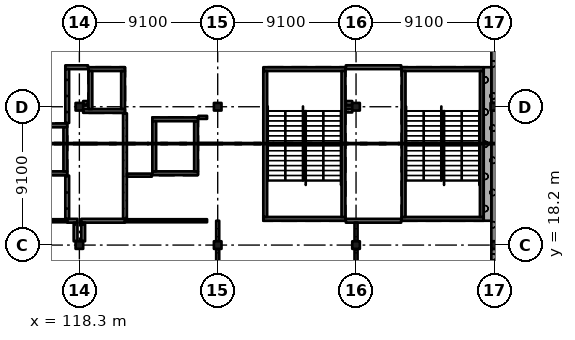
"""IFC4 building model, lengths in metres.
Left out: names, types, materials, properties, quantities, classifications, styles, units other than length and angle.
Written with IfcOpenShell. Run it as: python <this file> out.ifc"""

import sys

from ifc_helpers import new_model, si_unit, direction, frame, frame_2d, origin, origin_2d, place, context, subcontext, project, spatial, rectangle, extrude, element, fill, save


model = new_model("IFC4")
c1 = context("Model", 3, precision=1e-05, world=origin(), true_north=direction((0.0, 1.0)))
c2 = subcontext(c1, "Body", "Model", "MODEL_VIEW")
j1 = project(units=[si_unit("LENGTHUNIT", "METRE"), si_unit("PLANEANGLEUNIT", "RADIAN")], contexts=[c1])
p1 = place(None, origin())
s1 = spatial("IfcSite", under=j1, at=p1, CompositionType="ELEMENT")
p2 = place(p1, origin())
s2 = spatial("IfcBuilding", under=s1, at=p2, CompositionType="ELEMENT")
p3 = place(p2, frame((0.0, 0.0, 24.57)))
s3 = spatial("IfcBuildingStorey", under=s2, at=p3, CompositionType="ELEMENT", Elevation=24.57)
for number, where, z_axis, x_axis in (
    (1, (118.3, 18.2, 0.0), (0.0, 0.0, 1.0), (1.0, 0.0, 0.0)),
    (2, (118.3, 27.3, 0.0), (0.0, 0.0, 1.0), (1.0, 0.0, 0.0)),
    (3, (127.4, 18.2, 0.0), (0.0, 0.0, 1.0), (1.0, 0.0, 0.0)),
    (4, (127.4, 27.3, 0.0), (0.0, 0.0, 1.0), (1.0, 0.0, 0.0)),
    (5, (136.5, 18.2, 0.0), (0.0, 0.0, 1.0), (1.0, 0.0, 0.0)),
    (6, (136.5, 27.3, 0.0), (0.0, 0.0, 1.0), (1.0, 0.0, 0.0)),
    (7, (145.65, 18.2, 0.0), (0.0, 0.0, 1.0), (1.0, 0.0, 0.0)),
    (8, (145.6, 27.3, 0.0), (0.0, 0.0, 1.0), (1.0, 0.0, 0.0)),
):
    element("IfcColumn", number, at=place(p3, frame(where, z_axis=z_axis, x_axis=x_axis)), inside=s3, PredefinedType="COLUMN", context=c2, shape_type="SweptSolid", body=[
        extrude(rectangle(XDim=0.5, YDim=0.5, at=origin_2d()), origin(), (0.0, 0.0, 1.0), 4.55),
    ])
p4 = place(p3, frame((117.5, 22.925, 0.0), z_axis=(0.0, 0.0, 1.0), x_axis=(-1.0, 0.0, 0.0)))
e9 = element("IfcWall", 9, at=p4, inside=s3, PredefinedType="SHEAR", context=c2, shape_type="SweptSolid", body=[
    extrude(rectangle(XDim=2.6, YDim=0.25, at=frame_2d((1.3, 0.0))), origin(), (0.0, 0.0, 1.0), 4.55),
])
p5 = place(p4, frame((0.8, 0.0, 0.0)))
e10 = element("IfcOpeningElement", 10, at=p5, cuts=e9, PredefinedType="OPENING", context=c2, shape_type="SweptSolid", body=[
    extrude(rectangle(XDim=1.0, YDim=2.1, at=frame_2d((0.5, 1.05))), frame((0.0, 0.135, 0.0), z_axis=(0.0, -1.0, 0.0), x_axis=(1.0, 0.0, 0.0)), (0.0, 0.0, 1.0), 0.27),
])
p6 = place(p3, frame((117.5, 26.075, 0.0), z_axis=(0.0, 0.0, 1.0), x_axis=(-1.0, 0.0, 0.0)))
e11 = element("IfcWall", 11, at=p6, inside=s3, PredefinedType="SHEAR", context=c2, shape_type="SweptSolid", body=[
    extrude(rectangle(XDim=2.6, YDim=0.25, at=frame_2d((1.3, 0.0))), origin(), (0.0, 0.0, 1.0), 4.55),
])
p7 = place(p3, frame((117.375, 25.95, 0.0), z_axis=(0.0, 0.0, 1.0), x_axis=(0.0, -1.0, 0.0)))
e12 = element("IfcWall", 12, at=p7, inside=s3, PredefinedType="SHEAR", context=c2, shape_type="SweptSolid", body=[
    extrude(rectangle(XDim=2.9, YDim=0.25, at=frame_2d((1.45, 0.0))), origin(), (0.0, 0.0, 1.0), 4.55),
])
p8 = place(p3, frame((121.3, 27.025, 0.0), z_axis=(0.0, 0.0, 1.0), x_axis=(-1.0, 0.0, 0.0)))
e13 = element("IfcWall", 13, at=p8, inside=s3, PredefinedType="SHEAR", context=c2, shape_type="SweptSolid", body=[
    extrude(rectangle(XDim=2.75, YDim=0.25, at=frame_2d((1.375, 0.0))), origin(), (0.0, 0.0, 1.0), 4.55),
])
p9 = place(p3, frame((121.3, 29.775, 0.0), z_axis=(0.0, 0.0, 1.0), x_axis=(-1.0, 0.0, 0.0)))
e14 = element("IfcWall", 14, at=p9, inside=s3, PredefinedType="SHEAR", context=c2, shape_type="SweptSolid", body=[
    extrude(rectangle(XDim=2.4, YDim=0.25, at=frame_2d((1.2, 0.0))), origin(), (0.0, 0.0, 1.0), 4.55),
])
p10 = place(p3, frame((119.025, 29.65, 0.0), z_axis=(0.0, 0.0, 1.0), x_axis=(0.0, -1.0, 0.0)))
e15 = element("IfcWall", 15, at=p10, inside=s3, PredefinedType="SHEAR", context=c2, shape_type="SweptSolid", body=[
    extrude(rectangle(XDim=2.5, YDim=0.25, at=frame_2d((1.25, 0.0))), origin(), (0.0, 0.0, 1.0), 4.55),
])
p11 = place(p3, frame((121.175, 29.65, 0.0), z_axis=(0.0, 0.0, 1.0), x_axis=(0.0, -1.0, 0.0)))
e16 = element("IfcWall", 16, at=p11, inside=s3, PredefinedType="SHEAR", context=c2, shape_type="SweptSolid", body=[
    extrude(rectangle(XDim=2.5, YDim=0.25, at=frame_2d((1.25, 0.0))), origin(), (0.0, 0.0, 1.0), 4.55),
])
p12 = place(p11, frame((0.9, 0.0, 0.0)))
e17 = element("IfcOpeningElement", 17, at=p12, cuts=e16, PredefinedType="OPENING", context=c2, shape_type="SweptSolid", body=[
    extrude(rectangle(XDim=0.7, YDim=2.1, at=frame_2d((0.35, 1.05))), frame((0.0, 0.135, 0.0), z_axis=(0.0, -1.0, 0.0), x_axis=(1.0, 0.0, 0.0)), (0.0, 0.0, 1.0), 0.27),
])
p13 = place(p3, frame((126.1, 22.925, 0.0), z_axis=(0.0, 0.0, 1.0), x_axis=(-1.0, 0.0, 0.0)))
e18 = element("IfcWall", 18, at=p13, inside=s3, PredefinedType="SHEAR", context=c2, shape_type="SweptSolid", body=[
    extrude(rectangle(XDim=3.0, YDim=0.25, at=frame_2d((1.5, 0.0))), origin(), (0.0, 0.0, 1.0), 4.55),
])
p14 = place(p13, frame((0.95, 0.0, 0.0)))
e19 = element("IfcOpeningElement", 19, at=p14, cuts=e18, PredefinedType="OPENING", context=c2, shape_type="SweptSolid", body=[
    extrude(rectangle(XDim=1.1, YDim=2.1, at=frame_2d((0.55, 1.05))), frame((0.0, 0.135, 0.0), z_axis=(0.0, -1.0, 0.0), x_axis=(1.0, 0.0, 0.0)), (0.0, 0.0, 1.0), 0.27),
])
p15 = place(p3, frame((126.1, 26.475, 0.0), z_axis=(0.0, 0.0, 1.0), x_axis=(-1.0, 0.0, 0.0)))
e20 = element("IfcWall", 20, at=p15, inside=s3, PredefinedType="SHEAR", context=c2, shape_type="SweptSolid", body=[
    extrude(rectangle(XDim=3.0, YDim=0.25, at=frame_2d((1.5, 0.0))), origin(), (0.0, 0.0, 1.0), 4.55),
])
for number, where, z_axis, x_axis in (
    (21, (123.225, 26.35, 0.0), (0.0, 0.0, 1.0), (0.0, -1.0, 0.0)),
    (22, (125.975, 26.35, 0.0), (0.0, 0.0, 1.0), (0.0, -1.0, 0.0)),
):
    element("IfcWall", number, at=place(p3, frame(where, z_axis=z_axis, x_axis=x_axis)), inside=s3, PredefinedType="SHEAR", context=c2, shape_type="SweptSolid", body=[
        extrude(rectangle(XDim=3.3, YDim=0.25, at=frame_2d((1.65, 0.0))), origin(), (0.0, 0.0, 1.0), 4.55),
    ])
p16 = place(p3, frame((144.9, 19.925, 0.0), z_axis=(0.0, 0.0, 1.0), x_axis=(-1.0, 0.0, 0.0)))
e23 = element("IfcWall", 23, at=p16, inside=s3, PredefinedType="SHEAR", context=c2, shape_type="SweptSolid", body=[
    extrude(rectangle(XDim=5.4, YDim=0.25, at=frame_2d((2.7, 0.0))), origin(), (0.0, 0.0, 1.0), 4.55),
])
p17 = place(p16, frame((1.5, 0.0, 0.0)))
e24 = element("IfcOpeningElement", 24, at=p17, cuts=e23, PredefinedType="OPENING", context=c2, shape_type="SweptSolid", body=[
    extrude(rectangle(XDim=2.4, YDim=2.1, at=frame_2d((1.2, 1.05))), frame((0.0, 0.135, 0.0), z_axis=(0.0, -1.0, 0.0), x_axis=(1.0, 0.0, 0.0)), (0.0, 0.0, 1.0), 0.27),
])
p18 = place(p3, frame((144.9, 29.775, 0.0), z_axis=(0.0, 0.0, 1.0), x_axis=(-1.0, 0.0, 0.0)))
e25 = element("IfcWall", 25, at=p18, inside=s3, PredefinedType="SHEAR", context=c2, shape_type="SweptSolid", body=[
    extrude(rectangle(XDim=5.4, YDim=0.25, at=frame_2d((2.7, 0.0))), origin(), (0.0, 0.0, 1.0), 4.55),
])
for number, where, z_axis, x_axis in (
    (26, (139.625, 29.65, 0.0), (0.0, 0.0, 1.0), (0.0, -1.0, 0.0)),
    (27, (144.775, 29.65, 0.0), (0.0, 0.0, 1.0), (0.0, -1.0, 0.0)),
):
    element("IfcWall", number, at=place(p3, frame(where, z_axis=z_axis, x_axis=x_axis)), inside=s3, PredefinedType="SHEAR", context=c2, shape_type="SweptSolid", body=[
        extrude(rectangle(XDim=9.6, YDim=0.25, at=frame_2d((4.8, 0.0))), origin(), (0.0, 0.0, 1.0), 4.55),
    ])
p19 = place(p3, frame((135.8, 19.925, 0.0), z_axis=(0.0, 0.0, 1.0), x_axis=(-1.0, 0.0, 0.0)))
e28 = element("IfcWall", 28, at=p19, inside=s3, PredefinedType="SHEAR", context=c2, shape_type="SweptSolid", body=[
    extrude(rectangle(XDim=5.4, YDim=0.25, at=frame_2d((2.7, 0.0))), origin(), (0.0, 0.0, 1.0), 4.55),
])
p20 = place(p19, frame((1.5, 0.0, 0.0)))
e29 = element("IfcOpeningElement", 29, at=p20, cuts=e28, PredefinedType="OPENING", context=c2, shape_type="SweptSolid", body=[
    extrude(rectangle(XDim=2.4, YDim=2.1, at=frame_2d((1.2, 1.05))), frame((0.0, 0.135, 0.0), z_axis=(0.0, -1.0, 0.0), x_axis=(1.0, 0.0, 0.0)), (0.0, 0.0, 1.0), 0.27),
])
p21 = place(p3, frame((135.8, 29.775, 0.0), z_axis=(0.0, 0.0, 1.0), x_axis=(-1.0, 0.0, 0.0)))
e30 = element("IfcWall", 30, at=p21, inside=s3, PredefinedType="SHEAR", context=c2, shape_type="SweptSolid", body=[
    extrude(rectangle(XDim=5.4, YDim=0.25, at=frame_2d((2.7, 0.0))), origin(), (0.0, 0.0, 1.0), 4.55),
])
for number, where, z_axis, x_axis in (
    (31, (130.525, 29.65, 0.0), (0.0, 0.0, 1.0), (0.0, -1.0, 0.0)),
    (32, (135.675, 29.65, 0.0), (0.0, 0.0, 1.0), (0.0, -1.0, 0.0)),
):
    element("IfcWall", number, at=place(p3, frame(where, z_axis=z_axis, x_axis=x_axis)), inside=s3, PredefinedType="SHEAR", context=c2, shape_type="SweptSolid", body=[
        extrude(rectangle(XDim=9.6, YDim=0.25, at=frame_2d((4.8, 0.0))), origin(), (0.0, 0.0, 1.0), 4.55),
    ])
p22 = place(p3, frame((145.575, 9.35, 0.0), z_axis=(0.0, 0.0, 1.0), x_axis=(0.0, 1.0, 0.0)))
e33 = element("IfcWall", 33, at=p22, inside=s3, PredefinedType="SOLIDWALL", context=c2, shape_type="SweptSolid", body=[
    extrude(rectangle(XDim=8.6, YDim=0.35, at=frame_2d((4.3, 0.0))), origin(), (0.0, 0.0, 1.0), 3.6),
])
p23 = place(p3, frame((145.575, 18.45, 0.0), z_axis=(0.0, 0.0, 1.0), x_axis=(0.0, 1.0, 0.0)))
e34 = element("IfcWall", 34, at=p23, inside=s3, PredefinedType="SOLIDWALL", context=c2, shape_type="SweptSolid", body=[
    extrude(rectangle(XDim=8.6, YDim=0.35, at=frame_2d((4.3, 0.0))), origin(), (0.0, 0.0, 1.0), 3.6),
])
p24 = place(p3, frame((145.575, 27.55, 0.0), z_axis=(0.0, 0.0, 1.0), x_axis=(0.0, 1.0, 0.0)))
e35 = element("IfcWall", 35, at=p24, inside=s3, PredefinedType="SOLIDWALL", context=c2, shape_type="SweptSolid", body=[
    extrude(rectangle(XDim=8.6, YDim=0.35, at=frame_2d((4.3, 0.0))), origin(), (0.0, 0.0, 1.0), 3.6),
])
p25 = place(p3, frame((145.15, 19.8, 0.0), z_axis=(0.0, 0.0, 1.0), x_axis=(0.0, 1.0, 0.0)))
e36 = element("IfcWall", 36, at=p25, inside=s3, PredefinedType="SOLIDWALL", context=c2, shape_type="SweptSolid", body=[
    extrude(rectangle(XDim=10.1, YDim=0.5, at=frame_2d((5.05, 0.0))), origin(), (0.0, 0.0, 1.0), 4.55),
])
p26 = place(p3, frame((112.2, 19.8, 0.0), z_axis=(0.0, 0.0, 1.0), x_axis=(1.0, 0.0, 0.0)))
e37 = element("IfcWall", 37, at=p26, inside=s3, PredefinedType="PARTITIONING", context=c2, shape_type="SweptSolid", body=[
    extrude(rectangle(XDim=5.3, YDim=0.2, at=frame_2d((2.65, 0.0))), origin(), (0.0, 0.0, 1.0), 4.35),
])
p27 = place(p26, frame((1.75, 0.0, 0.0)))
e38 = element("IfcOpeningElement", 38, at=p27, cuts=e37, PredefinedType="OPENING", context=c2, shape_type="SweptSolid", body=[
    extrude(rectangle(XDim=1.8, YDim=2.4, at=frame_2d((0.9, 1.2))), frame((0.0, 0.11, 0.0), z_axis=(0.0, -1.0, 0.0), x_axis=(1.0, 0.0, 0.0)), (0.0, 0.0, 1.0), 0.22),
])
p28 = place(p3, frame((117.375, 29.9, 0.0), z_axis=(0.0, 0.0, 1.0), x_axis=(1.0, 0.0, 0.0)))
e39 = element("IfcWall", 39, at=p28, inside=s3, PredefinedType="SOLIDWALL", context=c2, shape_type="SweptSolid", body=[
    extrude(rectangle(XDim=1.495, YDim=0.25, at=frame_2d((0.748, 0.0))), origin(), (0.0, 0.0, 1.0), 4.35),
])
p29 = place(p3, frame((117.5, 19.8, 0.0), z_axis=(0.0, 0.0, 1.0), x_axis=(1.0, 0.0, 0.0)))
e40 = element("IfcWall", 40, at=p29, inside=s3, PredefinedType="SOLIDWALL", context=c2, shape_type="SweptSolid", body=[
    extrude(rectangle(XDim=0.675, YDim=0.25, at=frame_2d((0.337, 0.0))), origin(), (0.0, 0.0, 1.0), 4.35),
])
p30 = place(p3, frame((117.5, 19.925, 0.0), z_axis=(0.0, 0.0, 1.0), x_axis=(0.0, 1.0, 0.0)))
e41 = element("IfcWall", 41, at=p30, inside=s3, PredefinedType="SOLIDWALL", context=c2, shape_type="SweptSolid", body=[
    extrude(rectangle(XDim=2.845, YDim=0.25, at=frame_2d((1.422, 0.0))), origin(), (0.0, 0.0, 1.0), 4.35),
])
p31 = place(p3, frame((117.5, 26.23, 0.0), z_axis=(0.0, 0.0, 1.0), x_axis=(0.0, 1.0, 0.0)))
e42 = element("IfcWall", 42, at=p31, inside=s3, PredefinedType="SOLIDWALL", context=c2, shape_type="SweptSolid", body=[
    extrude(rectangle(XDim=3.545, YDim=0.25, at=frame_2d((1.772, 0.0))), origin(), (0.0, 0.0, 1.0), 4.35),
])
p32 = place(p3, frame((118.05, 19.675, 0.0), z_axis=(0.0, 0.0, 1.0), x_axis=(0.0, -1.0, 0.0)))
e43 = element("IfcWall", 43, at=p32, inside=s3, PredefinedType="SOLIDWALL", context=c2, shape_type="SweptSolid", body=[
    extrude(rectangle(XDim=1.225, YDim=0.25, at=frame_2d((0.613, 0.0))), origin(), (0.0, 0.0, 1.0), 3.6),
])
p33 = place(p3, frame((118.425, 19.8, 0.0), z_axis=(0.0, 0.0, 1.0), x_axis=(1.0, 0.0, 0.0)))
e44 = element("IfcWall", 44, at=p33, inside=s3, PredefinedType="SOLIDWALL", context=c2, shape_type="SweptSolid", body=[
    extrude(rectangle(XDim=2.875, YDim=0.25, at=frame_2d((1.438, 0.0))), origin(), (0.0, 0.0, 1.0), 4.35),
])
p34 = place(p33, frame((0.95, 0.0, 0.0)))
e45 = element("IfcOpeningElement", 45, at=p34, cuts=e44, PredefinedType="OPENING", context=c2, shape_type="SweptSolid", body=[
    extrude(rectangle(XDim=1.0, YDim=2.1, at=frame_2d((0.5, 1.05))), frame((0.0, 0.135, 0.0), z_axis=(0.0, -1.0, 0.0), x_axis=(1.0, 0.0, 0.0)), (0.0, 0.0, 1.0), 0.27),
])
p35 = place(p3, frame((118.55, 18.45, 0.0), z_axis=(0.0, 0.0, 1.0), x_axis=(0.0, 1.0, 0.0)))
e46 = element("IfcWall", 46, at=p35, inside=s3, PredefinedType="SOLIDWALL", context=c2, shape_type="SweptSolid", body=[
    extrude(rectangle(XDim=1.225, YDim=0.25, at=frame_2d((0.613, 0.0))), origin(), (0.0, 0.0, 1.0), 3.6),
])
p36 = place(p3, frame((118.87, 27.55, 0.0), z_axis=(0.0, 0.0, 1.0), x_axis=(-1.0, 0.0, 0.0)))
e47 = element("IfcWall", 47, at=p36, inside=s3, PredefinedType="SOLIDWALL", context=c2, shape_type="SweptSolid", body=[
    extrude(rectangle(XDim=0.32, YDim=0.25, at=frame_2d((0.16, 0.0))), origin(), (0.0, 0.0, 1.0), 4.35),
])
p37 = place(p3, frame((121.3, 19.8, 0.0), z_axis=(0.0, 0.0, 1.0), x_axis=(1.0, 0.0, 0.0)))
e48 = element("IfcWall", 48, at=p37, inside=s3, PredefinedType="PARTITIONING", context=c2, shape_type="SweptSolid", body=[
    extrude(rectangle(XDim=5.4, YDim=0.2, at=frame_2d((2.7, 0.0))), origin(), (0.0, 0.0, 1.0), 4.35),
])
p38 = place(p37, frame((1.85, 0.0, 0.0)))
e49 = element("IfcOpeningElement", 49, at=p38, cuts=e48, PredefinedType="OPENING", context=c2, shape_type="SweptSolid", body=[
    extrude(rectangle(XDim=1.8, YDim=2.4, at=frame_2d((0.9, 1.2))), frame((0.0, 0.11, 0.0), z_axis=(0.0, -1.0, 0.0), x_axis=(1.0, 0.0, 0.0)), (0.0, 0.0, 1.0), 0.22),
])
p39 = place(p3, frame((121.3, 19.925, 0.0), z_axis=(0.0, 0.0, 1.0), x_axis=(0.0, 1.0, 0.0)))
e50 = element("IfcWall", 50, at=p39, inside=s3, PredefinedType="SOLIDWALL", context=c2, shape_type="SweptSolid", body=[
    extrude(rectangle(XDim=6.945, YDim=0.25, at=frame_2d((3.473, 0.0))), origin(), (0.0, 0.0, 1.0), 4.35),
])
p40 = place(p3, frame((121.425, 22.8, 0.0), z_axis=(0.0, 0.0, 1.0), x_axis=(1.0, 0.0, 0.0)))
e51 = element("IfcWall", 51, at=p40, inside=s3, PredefinedType="PARTITIONING", context=c2, shape_type="SweptSolid", body=[
    extrude(rectangle(XDim=1.645, YDim=0.2, at=frame_2d((0.823, 0.0))), origin(), (0.0, 0.0, 1.0), 4.35),
])
p41 = place(p3, frame((126.13, 26.6, 0.0), z_axis=(0.0, 0.0, 1.0), x_axis=(1.0, 0.0, 0.0)))
e52 = element("IfcWall", 52, at=p41, inside=s3, PredefinedType="PARTITIONING", context=c2, shape_type="SweptSolid", body=[
    extrude(rectangle(XDim=0.57, YDim=0.2, at=frame_2d((0.285, 0.0))), origin(), (0.0, 0.0, 1.0), 4.35),
])
p42 = place(p3, frame((127.4, 10.938, 0.0), z_axis=(0.0, 0.0, 1.0), x_axis=(0.0, 1.0, 0.0)))
e53 = element("IfcWall", 53, at=p42, inside=s3, PredefinedType="PARTITIONING", context=c2, shape_type="SweptSolid", body=[
    extrude(rectangle(XDim=7.012, YDim=0.2, at=frame_2d((3.506, 0.0))), origin(), (0.0, 0.0, 1.0), 3.6),
])
p43 = place(p42, frame((0.85, 0.0, 0.0)))
e54 = element("IfcOpeningElement", 54, at=p43, cuts=e53, PredefinedType="OPENING", context=c2, shape_type="SweptSolid", body=[
    extrude(rectangle(XDim=1.8, YDim=2.4, at=frame_2d((0.9, 1.2))), frame((0.0, 0.11, 0.0), z_axis=(0.0, -1.0, 0.0), x_axis=(1.0, 0.0, 0.0)), (0.0, 0.0, 1.0), 0.22),
])
p44 = place(p42, frame((4.35, 0.0, 0.0)))
e55 = element("IfcOpeningElement", 55, at=p44, cuts=e53, PredefinedType="OPENING", context=c2, shape_type="SweptSolid", body=[
    extrude(rectangle(XDim=1.8, YDim=2.4, at=frame_2d((0.9, 1.2))), frame((0.0, 0.11, 0.0), z_axis=(0.0, -1.0, 0.0), x_axis=(1.0, 0.0, 0.0)), (0.0, 0.0, 1.0), 0.22),
])
p45 = place(p3, frame((127.4, 18.45, 0.0), z_axis=(0.0, 0.0, 1.0), x_axis=(0.0, 1.0, 0.0)))
e56 = element("IfcWall", 56, at=p45, inside=s3, PredefinedType="PARTITIONING", context=c2, shape_type="SweptSolid", body=[
    extrude(rectangle(XDim=1.35, YDim=0.2, at=frame_2d((0.675, 0.0))), origin(), (0.0, 0.0, 1.0), 3.6),
])
p46 = place(p3, frame((135.83, 19.8, 0.0), z_axis=(0.0, 0.0, 1.0), x_axis=(1.0, 0.0, 0.0)))
e57 = element("IfcWall", 57, at=p46, inside=s3, PredefinedType="SOLIDWALL", context=c2, shape_type="SweptSolid", body=[
    extrude(rectangle(XDim=3.64, YDim=0.25, at=frame_2d((1.82, 0.0))), origin(), (0.0, 0.0, 1.0), 4.35),
])
p47 = place(p46, frame((1.62, 0.0, 0.0)))
e58 = element("IfcOpeningElement", 58, at=p47, cuts=e57, PredefinedType="OPENING", context=c2, shape_type="SweptSolid", body=[
    extrude(rectangle(XDim=1.0, YDim=2.1, at=frame_2d((0.5, 1.05))), frame((0.0, 0.135, 0.0), z_axis=(0.0, -1.0, 0.0), x_axis=(1.0, 0.0, 0.0)), (0.0, 0.0, 1.0), 0.27),
])
p48 = place(p3, frame((135.83, 27.05, 0.0), z_axis=(0.0, 0.0, 1.0), x_axis=(1.0, 0.0, 0.0)))
e59 = element("IfcWall", 59, at=p48, inside=s3, PredefinedType="SOLIDWALL", context=c2, shape_type="SweptSolid", body=[
    extrude(rectangle(XDim=0.42, YDim=0.25, at=frame_2d((0.21, 0.0))), origin(), (0.0, 0.0, 1.0), 4.35),
])
p49 = place(p3, frame((135.83, 29.9, 0.0), z_axis=(0.0, 0.0, 1.0), x_axis=(1.0, 0.0, 0.0)))
e60 = element("IfcWall", 60, at=p49, inside=s3, PredefinedType="SOLIDWALL", context=c2, shape_type="SweptSolid", body=[
    extrude(rectangle(XDim=3.64, YDim=0.25, at=frame_2d((1.82, 0.0))), origin(), (0.0, 0.0, 1.0), 4.35),
])
p50 = place(p3, frame((136.25, 27.55, 0.0), z_axis=(0.0, 0.0, 1.0), x_axis=(-1.0, 0.0, 0.0)))
e61 = element("IfcWall", 61, at=p50, inside=s3, PredefinedType="SOLIDWALL", context=c2, shape_type="SweptSolid", body=[
    extrude(rectangle(XDim=0.42, YDim=0.25, at=frame_2d((0.21, 0.0))), origin(), (0.0, 0.0, 1.0), 4.35),
])
p51 = place(p3, frame((136.5, 10.925, 0.0), z_axis=(0.0, 0.0, 1.0), x_axis=(0.0, 1.0, 0.0)))
e62 = element("IfcWall", 62, at=p51, inside=s3, PredefinedType="PARTITIONING", context=c2, shape_type="SweptSolid", body=[
    extrude(rectangle(XDim=7.025, YDim=0.2, at=frame_2d((3.512, 0.0))), origin(), (0.0, 0.0, 1.0), 3.6),
])
p52 = place(p51, frame((0.85, 0.0, 0.0)))
e63 = element("IfcOpeningElement", 63, at=p52, cuts=e62, PredefinedType="OPENING", context=c2, shape_type="SweptSolid", body=[
    extrude(rectangle(XDim=1.8, YDim=2.4, at=frame_2d((0.9, 1.2))), frame((0.0, 0.11, 0.0), z_axis=(0.0, -1.0, 0.0), x_axis=(1.0, 0.0, 0.0)), (0.0, 0.0, 1.0), 0.22),
])
p53 = place(p51, frame((4.35, 0.0, 0.0)))
e64 = element("IfcOpeningElement", 64, at=p53, cuts=e62, PredefinedType="OPENING", context=c2, shape_type="SweptSolid", body=[
    extrude(rectangle(XDim=1.8, YDim=2.4, at=frame_2d((0.9, 1.2))), frame((0.0, 0.11, 0.0), z_axis=(0.0, -1.0, 0.0), x_axis=(1.0, 0.0, 0.0)), (0.0, 0.0, 1.0), 0.22),
])
p54 = place(p3, frame((136.5, 18.45, 0.0), z_axis=(0.0, 0.0, 1.0), x_axis=(0.0, 1.0, 0.0)))
e65 = element("IfcWall", 65, at=p54, inside=s3, PredefinedType="PARTITIONING", context=c2, shape_type="SweptSolid", body=[
    extrude(rectangle(XDim=1.225, YDim=0.2, at=frame_2d((0.613, 0.0))), origin(), (0.0, 0.0, 1.0), 3.6),
])
p55 = place(p47, origin())
e66 = element("IfcDoor", 66, at=p55, inside=s3, OperationType="SINGLE_SWING_RIGHT", PredefinedType="DOOR", context=c2, shape_type="SweptSolid", body=[
    extrude(rectangle(XDim=1.0, YDim=2.1, at=frame_2d((0.5, 1.05))), frame((0.0, 0.025, 0.0), z_axis=(0.0, -1.0, 0.0), x_axis=(1.0, 0.0, 0.0)), (0.0, 0.0, 1.0), 0.05),
])
fill(e58, e66)
p56 = place(p34, origin())
e67 = element("IfcDoor", 67, at=p56, inside=s3, OperationType="SINGLE_SWING_LEFT", PredefinedType="DOOR", context=c2, shape_type="SweptSolid", body=[
    extrude(rectangle(XDim=1.0, YDim=2.1, at=frame_2d((0.5, 1.05))), frame((0.0, 0.025, 0.0), z_axis=(0.0, -1.0, 0.0), x_axis=(1.0, 0.0, 0.0)), (0.0, 0.0, 1.0), 0.05),
])
fill(e45, e67)
p57 = place(p38, origin())
e68 = element("IfcDoor", 68, at=p57, inside=s3, OperationType="DOUBLE_DOOR_SINGLE_SWING", PredefinedType="DOOR", context=c2, shape_type="SweptSolid", body=[
    extrude(rectangle(XDim=1.8, YDim=2.4, at=frame_2d((0.9, 1.2))), frame((0.0, 0.025, 0.0), z_axis=(0.0, -1.0, 0.0), x_axis=(1.0, 0.0, 0.0)), (0.0, 0.0, 1.0), 0.05),
])
fill(e49, e68)
p58 = place(p12, origin())
e69 = element("IfcDoor", 69, at=p58, inside=s3, OperationType="SINGLE_SWING_RIGHT", PredefinedType="DOOR", context=c2, shape_type="SweptSolid", body=[
    extrude(rectangle(XDim=0.7, YDim=2.1, at=frame_2d((0.35, 1.05))), frame((0.0, 0.025, 0.0), z_axis=(0.0, -1.0, 0.0), x_axis=(1.0, 0.0, 0.0)), (0.0, 0.0, 1.0), 0.05),
])
fill(e17, e69)
p59 = place(p17, origin())
e70 = element("IfcDoor", 70, at=p59, inside=s3, OperationType="DOUBLE_DOOR_SINGLE_SWING", PredefinedType="DOOR", context=c2, shape_type="SweptSolid", body=[
    extrude(rectangle(XDim=2.4, YDim=2.1, at=frame_2d((1.2, 1.05))), frame((0.0, 0.025, 0.0), z_axis=(0.0, -1.0, 0.0), x_axis=(1.0, 0.0, 0.0)), (0.0, 0.0, 1.0), 0.05),
])
fill(e24, e70)
p60 = place(p20, origin())
e71 = element("IfcDoor", 71, at=p60, inside=s3, OperationType="DOUBLE_DOOR_SINGLE_SWING", PredefinedType="DOOR", context=c2, shape_type="SweptSolid", body=[
    extrude(rectangle(XDim=2.4, YDim=2.1, at=frame_2d((1.2, 1.05))), frame((0.0, 0.025, 0.0), z_axis=(0.0, -1.0, 0.0), x_axis=(1.0, 0.0, 0.0)), (0.0, 0.0, 1.0), 0.05),
])
fill(e29, e71)
p61 = place(p5, origin())
e72 = element("IfcDoor", 72, at=p61, inside=s3, OperationType="DOUBLE_DOOR_SLIDING", PredefinedType="DOOR", context=c2, shape_type="SweptSolid", body=[
    extrude(rectangle(XDim=1.0, YDim=2.1, at=frame_2d((0.5, 1.05))), frame((0.0, 0.025, 0.0), z_axis=(0.0, -1.0, 0.0), x_axis=(1.0, 0.0, 0.0)), (0.0, 0.0, 1.0), 0.05),
])
fill(e10, e72)
p62 = place(p14, origin())
e73 = element("IfcDoor", 73, at=p62, inside=s3, OperationType="DOUBLE_DOOR_SLIDING", PredefinedType="DOOR", context=c2, shape_type="SweptSolid", body=[
    extrude(rectangle(XDim=1.1, YDim=2.1, at=frame_2d((0.55, 1.05))), frame((0.0, 0.025, 0.0), z_axis=(0.0, -1.0, 0.0), x_axis=(1.0, 0.0, 0.0)), (0.0, 0.0, 1.0), 0.05),
])
fill(e19, e73)
save(model, sys.argv[1])
